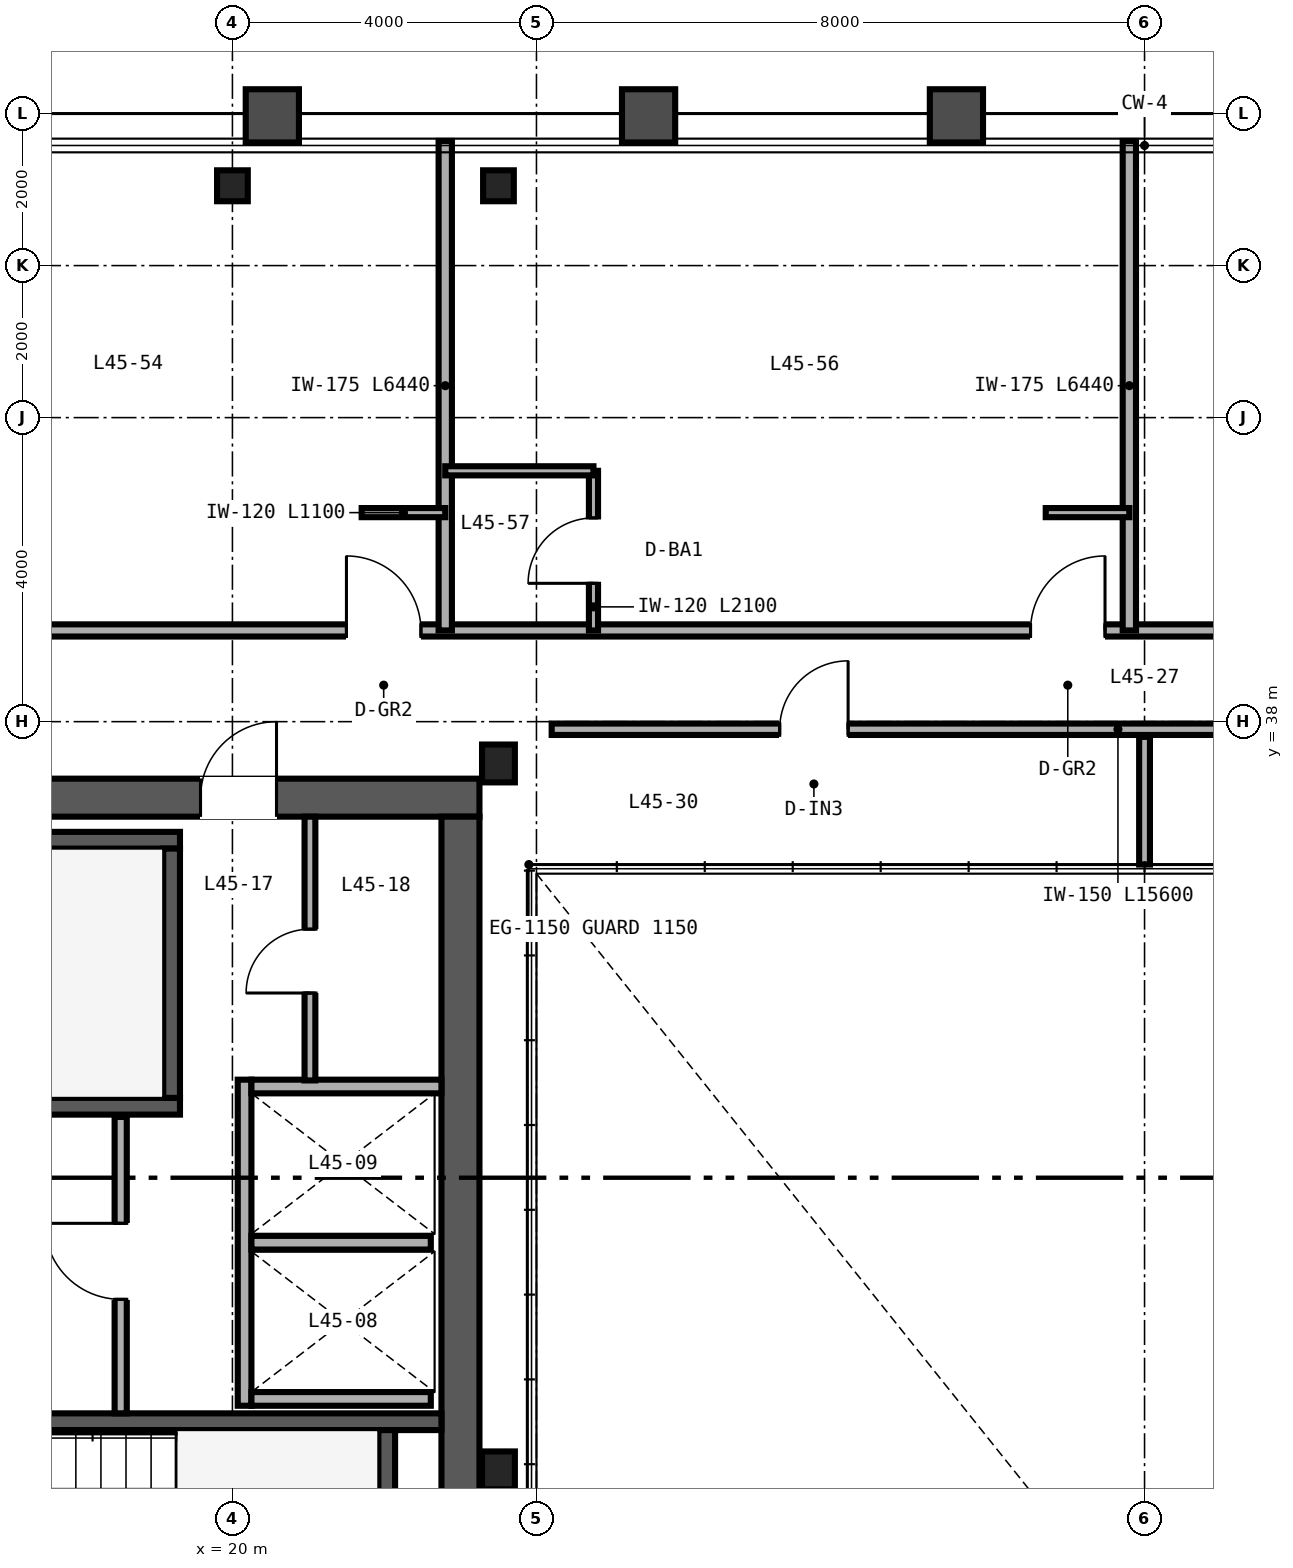
"""IFC4 building model, lengths in metres.
Left out: names, types, materials, properties, quantities, classifications, styles, units other than length and angle.
Written with IfcOpenShell. Run it as: python <this file> out.ifc"""

import sys

from ifc_helpers import new_model, si_unit, direction, frame, frame_2d, origin, origin_2d, place, context, subcontext, project, spatial, rectangle, i_section, extrude, source, transform, mapped, element, fill, save


model = new_model("IFC4")
c1 = context("Model", 3, precision=1e-05, world=origin(), true_north=direction((0.0, 1.0)))
c2 = subcontext(c1, "Body", "Model", "MODEL_VIEW")
j1 = project(units=[si_unit("LENGTHUNIT", "METRE"), si_unit("PLANEANGLEUNIT", "RADIAN")], contexts=[c1])
p1 = place(None, origin())
s1 = spatial("IfcSite", under=j1, at=p1, CompositionType="ELEMENT")
p2 = place(p1, origin())
s2 = spatial("IfcBuilding", under=s1, at=p2, CompositionType="ELEMENT")
p3 = place(p2, frame((0.0, 0.0, 181.2)))
s3 = spatial("IfcBuildingStorey", under=s2, at=p3, CompositionType="ELEMENT", Elevation=181.2)
p4 = place(p3, frame((10.75, 37.0, 0.0), z_axis=(0.0, 0.0, 1.0), x_axis=(1.0, 0.0, 0.0)))
e1 = element("IfcWall", 1, at=p4, inside=s3, PredefinedType="SHEAR", context=c2, shape_type="SweptSolid", body=[
    extrude(rectangle(XDim=12.5, YDim=0.5, at=frame_2d((6.25, 0.0))), origin(), (0.0, 0.0, 1.0), 3.37),
])
p5 = place(p4, frame((8.83, 0.0, 0.0)))
e2 = element("IfcOpeningElement", 2, at=p5, cuts=e1, PredefinedType="OPENING", context=c2, shape_type="SweptSolid", body=[
    extrude(rectangle(XDim=1.0, YDim=2.15, at=frame_2d((0.5, 1.075))), frame((0.0, 0.26, 0.0), z_axis=(0.0, -1.0, 0.0), x_axis=(1.0, 0.0, 0.0)), (0.0, 0.0, 1.0), 0.52),
])
p6 = place(p3, frame((23.0, 15.25, 0.0), z_axis=(0.0, 0.0, 1.0), x_axis=(0.0, 1.0, 0.0)))
e3 = element("IfcWall", 3, at=p6, inside=s3, PredefinedType="SHEAR", context=c2, shape_type="SweptSolid", body=[
    extrude(rectangle(XDim=21.5, YDim=0.5, at=frame_2d((10.75, 0.0))), origin(), (0.0, 0.0, 1.0), 3.37),
])
p7 = place(p3, frame((11.25, 32.94, 0.0), z_axis=(0.0, 0.0, 1.0), x_axis=(1.0, 0.0, 0.0)))
e4 = element("IfcWall", 4, at=p7, inside=s3, PredefinedType="SHEAR", context=c2, shape_type="SweptSolid", body=[
    extrude(rectangle(XDim=8.06, YDim=0.22, at=frame_2d((4.03, 0.0))), origin(), (0.0, 0.0, 1.0), 3.4),
])
p8 = place(p7, frame((0.67, 0.0, 0.0)))
e5 = element("IfcOpeningElement", 5, at=p8, cuts=e4, PredefinedType="OPENING", context=c2, shape_type="SweptSolid", body=[
    extrude(rectangle(XDim=1.05, YDim=2.15, at=frame_2d((0.525, 1.075))), frame((0.0, 0.12, 0.0), z_axis=(0.0, -1.0, 0.0), x_axis=(1.0, 0.0, 0.0)), (0.0, 0.0, 1.0), 0.24),
])
p9 = place(p3, frame((11.25, 36.44, 0.0), z_axis=(0.0, 0.0, 1.0), x_axis=(1.0, 0.0, 0.0)))
e6 = element("IfcWall", 6, at=p9, inside=s3, PredefinedType="SHEAR", context=c2, shape_type="SweptSolid", body=[
    extrude(rectangle(XDim=8.06, YDim=0.22, at=frame_2d((4.03, 0.0))), origin(), (0.0, 0.0, 1.0), 3.4),
])
p10 = place(p3, frame((19.2, 33.05, 0.0), z_axis=(0.0, 0.0, 1.0), x_axis=(0.0, 1.0, 0.0)))
e7 = element("IfcWall", 7, at=p10, inside=s3, PredefinedType="SHEAR", context=c2, shape_type="SweptSolid", body=[
    extrude(rectangle(XDim=3.28, YDim=0.22, at=frame_2d((1.64, 0.0))), origin(), (0.0, 0.0, 1.0), 3.4),
])
p11 = place(p3, frame((14.18, 28.79, 0.0), z_axis=(0.0, 0.0, 1.0), x_axis=(1.0, 0.0, 0.0)))
e8 = element("IfcWall", 8, at=p11, inside=s3, PredefinedType="SHEAR", context=c2, shape_type="SweptSolid", body=[
    extrude(rectangle(XDim=8.57, YDim=0.22, at=frame_2d((4.285, 0.0))), origin(), (0.0, 0.0, 1.0), 3.4),
])
p12 = place(p3, frame((22.03, 25.4, 0.0), z_axis=(0.0, 0.0, 1.0), x_axis=(0.0, 1.0, 0.0)))
e9 = element("IfcWall", 9, at=p12, inside=s3, PredefinedType="SHEAR", context=c2, shape_type="SweptSolid", body=[
    extrude(rectangle(XDim=3.28, YDim=0.22, at=frame_2d((1.64, 0.0))), origin(), (0.0, 0.0, 1.0), 3.4),
])
m1 = source(origin(), c2, "Body", "SweptSolid", [
    extrude(i_section(OverallWidth=0.432, OverallDepth=0.498, WebThickness=0.056, FlangeThickness=0.089, FilletRadius=0.025, at=origin_2d()), origin(), (0.0, 0.0, 1.0), 3.37),
])
for number, where, z_axis, x_axis in (
    (10, (23.5, 28.15, 0.0), (0.0, 0.0, 1.0), (1.0, 0.0, 0.0)),
    (11, (23.5, 37.45, 0.0), (0.0, 0.0, 1.0), (1.0, 0.0, 0.0)),
):
    element("IfcColumn", number, at=place(p3, frame(where, z_axis=z_axis, x_axis=x_axis)), inside=s3, PredefinedType="COLUMN", context=c2, shape_type="MappedRepresentation", body=[
        mapped(m1, transform((0.0, 0.0, 0.0), scale=1.0)),
    ])
m2 = source(origin(), c2, "Body", "SweptSolid", [
    extrude(i_section(OverallWidth=0.404, OverallDepth=0.407, WebThickness=0.027, FlangeThickness=0.044, FilletRadius=0.025, at=origin_2d()), origin(), (0.0, 0.0, 1.0), 3.37),
])
for number, where, z_axis, x_axis in (
    (12, (20.0, 45.05, 0.0), (0.0, 0.0, 1.0), (1.0, 0.0, 0.0)),
    (13, (23.5, 45.05, 0.0), (0.0, 0.0, 1.0), (1.0, 0.0, 0.0)),
):
    element("IfcColumn", number, at=place(p3, frame(where, z_axis=z_axis, x_axis=x_axis)), inside=s3, PredefinedType="COLUMN", context=c2, shape_type="MappedRepresentation", body=[
        mapped(m2, transform((0.0, 0.0, 0.0), scale=1.0)),
    ])
p13 = place(p3, frame((20.16, 29.0, 0.0), z_axis=(0.0, 0.0, 1.0), x_axis=(0.0, 1.0, 0.0)))
e14 = element("IfcWall", 14, at=p13, inside=s3, PredefinedType="SOLIDWALL", context=c2, shape_type="SweptSolid", body=[
    extrude(rectangle(XDim=4.29, YDim=0.18, at=frame_2d((2.145, 0.0))), origin(), (0.0, 0.0, 1.0), 3.37),
])
p14 = place(p3, frame((20.25, 29.09, 0.0), z_axis=(0.0, 0.0, 1.0), x_axis=(1.0, 0.0, 0.0)))
e15 = element("IfcWall", 15, at=p14, inside=s3, PredefinedType="SOLIDWALL", context=c2, shape_type="SweptSolid", body=[
    extrude(rectangle(XDim=2.36, YDim=0.18, at=frame_2d((1.18, 0.0))), origin(), (0.0, 0.0, 1.0), 3.37),
])
p15 = place(p3, frame((20.25, 33.2, 0.0), z_axis=(0.0, 0.0, 1.0), x_axis=(1.0, 0.0, 0.0)))
e16 = element("IfcWall", 16, at=p15, inside=s3, PredefinedType="SOLIDWALL", context=c2, shape_type="SweptSolid", body=[
    extrude(rectangle(XDim=2.5, YDim=0.18, at=frame_2d((1.25, 0.0))), origin(), (0.0, 0.0, 1.0), 3.37),
])
p16 = place(p3, frame((20.25, 31.145, 0.0), z_axis=(0.0, 0.0, 1.0), x_axis=(1.0, 0.0, 0.0)))
e17 = element("IfcWall", 17, at=p16, inside=s3, PredefinedType="SOLIDWALL", context=c2, shape_type="SweptSolid", body=[
    extrude(rectangle(XDim=2.36, YDim=0.18, at=frame_2d((1.18, 0.0))), origin(), (0.0, 0.0, 1.0), 3.37),
])
p17 = place(p3, frame((18.53, 28.9, 0.0), z_axis=(0.0, 0.0, 1.0), x_axis=(0.0, 1.0, 0.0)))
e18 = element("IfcWall", 18, at=p17, inside=s3, PredefinedType="PARTITIONING", context=c2, shape_type="SweptSolid", body=[
    extrude(rectangle(XDim=3.9, YDim=0.16, at=frame_2d((1.95, 0.0))), origin(), (0.0, 0.0, 1.0), 3.37),
])
p18 = place(p17, frame((1.5, 0.0, 0.0)))
e19 = element("IfcOpeningElement", 19, at=p18, cuts=e18, PredefinedType="OPENING", context=c2, shape_type="SweptSolid", body=[
    extrude(rectangle(XDim=1.0, YDim=2.15, at=frame_2d((0.5, 1.075))), frame((0.0, 0.09, 0.0), z_axis=(0.0, -1.0, 0.0), x_axis=(1.0, 0.0, 0.0)), (0.0, 0.0, 1.0), 0.18),
])
p19 = place(p3, frame((21.02, 33.28, 0.0), z_axis=(0.0, 0.0, 1.0), x_axis=(0.0, 1.0, 0.0)))
e20 = element("IfcWall", 20, at=p19, inside=s3, PredefinedType="PARTITIONING", context=c2, shape_type="SweptSolid", body=[
    extrude(rectangle(XDim=3.47, YDim=0.142, at=frame_2d((1.735, 0.0))), origin(), (0.0, 0.0, 1.0), 3.37),
])
p20 = place(p19, frame((1.15, 0.0, 0.0)))
e21 = element("IfcOpeningElement", 21, at=p20, cuts=e20, PredefinedType="OPENING", context=c2, shape_type="SweptSolid", body=[
    extrude(rectangle(XDim=0.84, YDim=2.1, at=frame_2d((0.42, 1.05))), frame((0.0, 0.081, 0.0), z_axis=(0.0, -1.0, 0.0), x_axis=(1.0, 0.0, 0.0)), (0.0, 0.0, 1.0), 0.162),
])
p21 = place(p3, frame((24.2, 37.9, 0.0), z_axis=(0.0, 0.0, 1.0), x_axis=(1.0, 0.0, 0.0)))
e22 = element("IfcWall", 22, at=p21, inside=s3, PredefinedType="PARTITIONING", context=c2, shape_type="SweptSolid", body=[
    extrude(rectangle(XDim=15.6, YDim=0.15, at=frame_2d((7.8, 0.0))), origin(), (0.0, 0.0, 1.0), 3.37),
])
p22 = place(p21, frame((3.0, 0.0, 0.0)))
e23 = element("IfcOpeningElement", 23, at=p22, cuts=e22, PredefinedType="OPENING", context=c2, shape_type="SweptSolid", body=[
    extrude(rectangle(XDim=0.9, YDim=2.15, at=frame_2d((0.45, 1.075))), frame((0.0, 0.085, 0.0), z_axis=(0.0, -1.0, 0.0), x_axis=(1.0, 0.0, 0.0)), (0.0, 0.0, 1.0), 0.17),
])
p23 = place(p21, frame((11.0, 0.0, 0.0)))
e24 = element("IfcOpeningElement", 24, at=p23, cuts=e22, PredefinedType="OPENING", context=c2, shape_type="SweptSolid", body=[
    extrude(rectangle(XDim=0.9, YDim=2.15, at=frame_2d((0.45, 1.075))), frame((0.0, 0.085, 0.0), z_axis=(0.0, -1.0, 0.0), x_axis=(1.0, 0.0, 0.0)), (0.0, 0.0, 1.0), 0.17),
])
p24 = place(p3, frame((32.0, 36.12, 0.0), z_axis=(0.0, 0.0, 1.0), x_axis=(0.0, 1.0, 0.0)))
e25 = element("IfcWall", 25, at=p24, inside=s3, PredefinedType="PARTITIONING", context=c2, shape_type="SweptSolid", body=[
    extrude(rectangle(XDim=1.68, YDim=0.142, at=frame_2d((0.84, 0.0))), origin(), (0.0, 0.0, 1.0), 3.37),
])
p25 = place(p3, frame((14.0, 39.2, 0.0), z_axis=(0.0, 0.0, 1.0), x_axis=(1.0, 0.0, 0.0)))
e26 = element("IfcWall", 26, at=p25, inside=s3, PredefinedType="PARTITIONING", context=c2, shape_type="SweptSolid", body=[
    extrude(rectangle(XDim=36.0, YDim=0.16, at=frame_2d((18.0, 0.0))), origin(), (0.0, 0.0, 1.0), 2.913),
])
p26 = place(p25, frame((7.5, 0.0, 0.0)))
e27 = element("IfcOpeningElement", 27, at=p26, cuts=e26, PredefinedType="OPENING", context=c2, shape_type="SweptSolid", body=[
    extrude(rectangle(XDim=0.98, YDim=2.2, at=frame_2d((0.49, 1.1))), frame((0.0, 0.09, 0.0), z_axis=(0.0, -1.0, 0.0), x_axis=(1.0, 0.0, 0.0)), (0.0, 0.0, 1.0), 0.18),
])
p27 = place(p25, frame((16.5, 0.0, 0.0)))
e28 = element("IfcOpeningElement", 28, at=p27, cuts=e26, PredefinedType="OPENING", context=c2, shape_type="SweptSolid", body=[
    extrude(rectangle(XDim=0.98, YDim=2.2, at=frame_2d((0.49, 1.1))), frame((0.0, 0.09, 0.0), z_axis=(0.0, -1.0, 0.0), x_axis=(1.0, 0.0, 0.0)), (0.0, 0.0, 1.0), 0.18),
])
p28 = place(p25, frame((21.82, 0.0, 0.0)))
e29 = element("IfcOpeningElement", 29, at=p28, cuts=e26, PredefinedType="OPENING", context=c2, shape_type="SweptSolid", body=[
    extrude(rectangle(XDim=0.96, YDim=2.15, at=frame_2d((0.48, 1.075))), frame((0.0, 0.09, 0.0), z_axis=(0.0, -1.0, 0.0), x_axis=(1.0, 0.0, 0.0)), (0.0, 0.0, 1.0), 0.18),
])
p29 = place(p25, frame((30.14, 0.0, 0.0)))
e30 = element("IfcOpeningElement", 30, at=p29, cuts=e26, PredefinedType="OPENING", context=c2, shape_type="SweptSolid", body=[
    extrude(rectangle(XDim=0.94, YDim=2.15, at=frame_2d((0.47, 1.075))), frame((0.0, 0.09, 0.0), z_axis=(0.0, -1.0, 0.0), x_axis=(1.0, 0.0, 0.0)), (0.0, 0.0, 1.0), 0.18),
])
p30 = place(p25, frame((34.74, 0.0, 0.0)))
e31 = element("IfcOpeningElement", 31, at=p30, cuts=e26, PredefinedType="OPENING", context=c2, shape_type="SweptSolid", body=[
    extrude(rectangle(XDim=0.94, YDim=2.15, at=frame_2d((0.47, 1.075))), frame((0.0, 0.09, 0.0), z_axis=(0.0, -1.0, 0.0), x_axis=(1.0, 0.0, 0.0)), (0.0, 0.0, 1.0), 0.18),
])
p31 = place(p3, frame((22.8, 39.2, 0.0), z_axis=(0.0, 0.0, 1.0), x_axis=(0.0, 1.0, 0.0)))
e32 = element("IfcWall", 32, at=p31, inside=s3, PredefinedType="PARTITIONING", context=c2, shape_type="SweptSolid", body=[
    extrude(rectangle(XDim=6.44, YDim=0.175, at=frame_2d((3.22, 0.0))), origin(), (0.0, 0.0, 1.0), 2.833),
])
p32 = place(p3, frame((21.7, 40.75, 0.0), z_axis=(0.0, 0.0, 1.0), x_axis=(1.0, 0.0, 0.0)))
e33 = element("IfcWall", 33, at=p32, inside=s3, PredefinedType="PARTITIONING", context=c2, shape_type="SweptSolid", body=[
    extrude(rectangle(XDim=1.1, YDim=0.12, at=frame_2d((0.55, 0.0))), origin(), (0.0, 0.0, 1.0), 3.37),
])
p33 = place(p3, frame((31.8, 39.2, 0.0), z_axis=(0.0, 0.0, 1.0), x_axis=(0.0, 1.0, 0.0)))
e34 = element("IfcWall", 34, at=p33, inside=s3, PredefinedType="PARTITIONING", context=c2, shape_type="SweptSolid", body=[
    extrude(rectangle(XDim=6.44, YDim=0.175, at=frame_2d((3.22, 0.0))), origin(), (0.0, 0.0, 1.0), 2.443),
])
p34 = place(p3, frame((24.75, 39.2, 0.0), z_axis=(0.0, 0.0, 1.0), x_axis=(0.0, 1.0, 0.0)))
e35 = element("IfcWall", 35, at=p34, inside=s3, PredefinedType="PARTITIONING", context=c2, shape_type="SweptSolid", body=[
    extrude(rectangle(XDim=2.1, YDim=0.12, at=frame_2d((1.05, 0.0))), origin(), (0.0, 0.0, 1.0), 3.37),
])
p35 = place(p34, frame((0.62, 0.0, 0.0)))
e36 = element("IfcOpeningElement", 36, at=p35, cuts=e35, PredefinedType="OPENING", context=c2, shape_type="SweptSolid", body=[
    extrude(rectangle(XDim=0.86, YDim=2.1, at=frame_2d((0.43, 1.05))), frame((0.0, 0.07, 0.0), z_axis=(0.0, -1.0, 0.0), x_axis=(1.0, 0.0, 0.0)), (0.0, 0.0, 1.0), 0.14),
])
p36 = place(p3, frame((22.8, 41.3, 0.0), z_axis=(0.0, 0.0, 1.0), x_axis=(1.0, 0.0, 0.0)))
e37 = element("IfcWall", 37, at=p36, inside=s3, PredefinedType="PARTITIONING", context=c2, shape_type="SweptSolid", body=[
    extrude(rectangle(XDim=1.95, YDim=0.12, at=frame_2d((0.975, 0.0))), origin(), (0.0, 0.0, 1.0), 2.913),
])
p37 = place(p3, frame((30.7, 40.75, 0.0), z_axis=(0.0, 0.0, 1.0), x_axis=(1.0, 0.0, 0.0)))
e38 = element("IfcWall", 38, at=p37, inside=s3, PredefinedType="PARTITIONING", context=c2, shape_type="SweptSolid", body=[
    extrude(rectangle(XDim=1.1, YDim=0.12, at=frame_2d((0.55, 0.0))), origin(), (0.0, 0.0, 1.0), 3.37),
])
m3 = source(origin(), c2, "Body", "SweptSolid", [
    extrude(rectangle(XDim=1.0, YDim=2.15, at=frame_2d((0.5, 1.075))), frame((0.0, 0.025, 0.0), z_axis=(0.0, -1.0, 0.0), x_axis=(1.0, 0.0, 0.0)), (0.0, 0.0, 1.0), 0.05),
])
p38 = place(p18, origin())
e39 = element("IfcDoor", 39, at=p38, inside=s3, OperationType="SINGLE_SWING_RIGHT", PredefinedType="DOOR", context=c2, shape_type="MappedRepresentation", body=[
    mapped(m3, transform((0.0, 0.0, 0.0), scale=1.0)),
])
fill(e19, e39)
m4 = source(origin(), c2, "Body", "SweptSolid", [
    extrude(rectangle(XDim=0.84, YDim=2.1, at=frame_2d((0.42, 1.05))), frame((0.0, 0.025, 0.0), z_axis=(0.0, -1.0, 0.0), x_axis=(1.0, 0.0, 0.0)), (0.0, 0.0, 1.0), 0.05),
])
p39 = place(p20, origin())
e40 = element("IfcDoor", 40, at=p39, inside=s3, OperationType="SINGLE_SWING_LEFT", PredefinedType="DOOR", context=c2, shape_type="MappedRepresentation", body=[
    mapped(m4, transform((0.0, 0.0, 0.0), scale=1.0)),
])
fill(e21, e40)
p40 = place(p5, origin())
e41 = element("IfcDoor", 41, at=p40, inside=s3, OperationType="SINGLE_SWING_RIGHT", PredefinedType="DOOR", context=c2, shape_type="MappedRepresentation", body=[
    mapped(m3, transform((0.0, 0.0, 0.0), scale=1.0)),
])
fill(e2, e41)
m5 = source(origin(), c2, "Body", "SweptSolid", [
    extrude(rectangle(XDim=0.9, YDim=2.15, at=frame_2d((0.45, 1.075))), frame((0.0, 0.025, 0.0), z_axis=(0.0, -1.0, 0.0), x_axis=(1.0, 0.0, 0.0)), (0.0, 0.0, 1.0), 0.05),
])
p41 = place(p22, origin())
e42 = element("IfcDoor", 42, at=p41, inside=s3, OperationType="SINGLE_SWING_RIGHT", PredefinedType="DOOR", context=c2, shape_type="MappedRepresentation", body=[
    mapped(m5, transform((0.0, 0.0, 0.0), scale=1.0)),
])
fill(e23, e42)
m6 = source(origin(), c2, "Body", "SweptSolid", [
    extrude(rectangle(XDim=0.86, YDim=2.1, at=frame_2d((0.43, 1.05))), frame((0.0, 0.025, 0.0), z_axis=(0.0, -1.0, 0.0), x_axis=(1.0, 0.0, 0.0)), (0.0, 0.0, 1.0), 0.05),
])
p42 = place(p35, origin())
e43 = element("IfcDoor", 43, at=p42, inside=s3, OperationType="SINGLE_SWING_LEFT", PredefinedType="DOOR", context=c2, shape_type="MappedRepresentation", body=[
    mapped(m6, transform((0.0, 0.0, 0.0), scale=1.0)),
])
fill(e36, e43)
m7 = source(origin(), c2, "Body", "SweptSolid", [
    extrude(rectangle(XDim=0.98, YDim=2.2, at=frame_2d((0.49, 1.1))), frame((0.0, 0.025, 0.0), z_axis=(0.0, -1.0, 0.0), x_axis=(1.0, 0.0, 0.0)), (0.0, 0.0, 1.0), 0.05),
])
p43 = place(p26, origin())
e44 = element("IfcDoor", 44, at=p43, inside=s3, OperationType="SINGLE_SWING_LEFT", PredefinedType="DOOR", context=c2, shape_type="MappedRepresentation", body=[
    mapped(m7, transform((0.0, 0.0, 0.0), scale=1.0)),
])
fill(e27, e44)
p44 = place(p27, origin())
e45 = element("IfcDoor", 45, at=p44, inside=s3, OperationType="SINGLE_SWING_RIGHT", PredefinedType="DOOR", context=c2, shape_type="MappedRepresentation", body=[
    mapped(m7, transform((0.0, 0.0, 0.0), scale=1.0)),
])
fill(e28, e45)
save(model, sys.argv[1])
